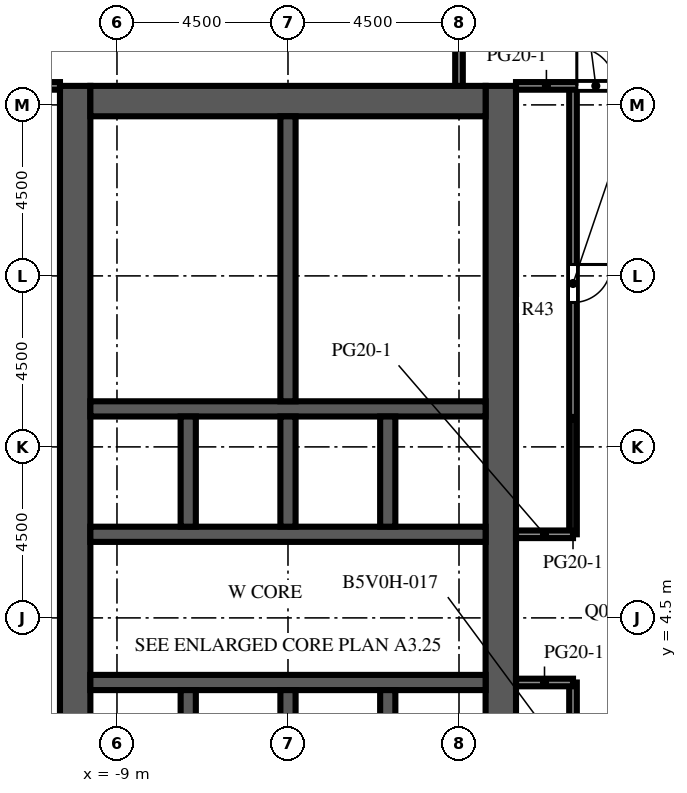
"""IFC4 building model, lengths in metres.
Left out: names, types, materials, properties, quantities, classifications, styles, units other than length and angle.
Written with IfcOpenShell. Run it as: python <this file> out.ifc"""

import sys

from ifc_helpers import new_model, si_unit, direction, frame, frame_2d, origin, place, context, subcontext, project, spatial, rectangle, extrude, element, fill, save


model = new_model("IFC4")
c1 = context("Model", 3, precision=1e-05, world=origin(), true_north=direction((0.0, 1.0)))
c2 = subcontext(c1, "Body", "Model", "MODEL_VIEW")
j1 = project(units=[si_unit("LENGTHUNIT", "METRE"), si_unit("PLANEANGLEUNIT", "RADIAN")], contexts=[c1])
p1 = place(None, origin())
s1 = spatial("IfcSite", under=j1, at=p1, CompositionType="ELEMENT")
p2 = place(p1, origin())
s2 = spatial("IfcBuilding", under=s1, at=p2, CompositionType="ELEMENT")
p3 = place(p2, frame((0.0, 0.0, 156.8)))
s3 = spatial("IfcBuildingStorey", under=s2, at=p3, CompositionType="ELEMENT", Elevation=156.8)
p4 = place(p3, frame((-10.1, -9.0, 0.0), z_axis=(0.0, 0.0, 1.0), x_axis=(0.0, 1.0, 0.0)))
e1 = element("IfcWall", 1, at=p4, inside=s3, PredefinedType="SHEAR", context=c2, shape_type="SweptSolid", body=[
    extrude(rectangle(XDim=27.5, YDim=0.8, at=frame_2d((13.75, 0.0))), origin(), (0.0, 0.0, 1.0), 4.1),
])
p5 = place(p4, frame((12.55, 0.0, 0.0)))
e2 = element("IfcOpeningElement", 2, at=p5, cuts=e1, PredefinedType="OPENING", context=c2, shape_type="SweptSolid", body=[
    extrude(rectangle(XDim=2.4, YDim=2.4, at=frame_2d((1.2, 1.2))), frame((0.0, 0.41, 0.0), z_axis=(0.0, -1.0, 0.0), x_axis=(1.0, 0.0, 0.0)), (0.0, 0.0, 1.0), 0.82),
])
p6 = place(p4, frame((6.825, 0.0, 0.0)))
e3 = element("IfcOpeningElement", 3, at=p6, cuts=e1, PredefinedType="OPENING", context=c2, shape_type="SweptSolid", body=[
    extrude(rectangle(XDim=1.2, YDim=2.1, at=frame_2d((0.6, 1.05))), frame((0.0, 0.41, 0.0), z_axis=(0.0, -1.0, 0.0), x_axis=(1.0, 0.0, 0.0)), (0.0, 0.0, 1.0), 0.82),
])
p7 = place(p4, frame((19.475, 0.0, 0.0)))
e4 = element("IfcOpeningElement", 4, at=p7, cuts=e1, PredefinedType="OPENING", context=c2, shape_type="SweptSolid", body=[
    extrude(rectangle(XDim=1.2, YDim=2.1, at=frame_2d((0.6, 1.05))), frame((0.0, 0.41, 0.0), z_axis=(0.0, -1.0, 0.0), x_axis=(1.0, 0.0, 0.0)), (0.0, 0.0, 1.0), 0.82),
])
p8 = place(p3, frame((1.1, -9.0, 0.0), z_axis=(0.0, 0.0, 1.0), x_axis=(0.0, 1.0, 0.0)))
e5 = element("IfcWall", 5, at=p8, inside=s3, PredefinedType="SHEAR", context=c2, shape_type="SweptSolid", body=[
    extrude(rectangle(XDim=27.5, YDim=0.8, at=frame_2d((13.75, 0.0))), origin(), (0.0, 0.0, 1.0), 4.1),
])
p9 = place(p8, frame((12.55, 0.0, 0.0)))
e6 = element("IfcOpeningElement", 6, at=p9, cuts=e5, PredefinedType="OPENING", context=c2, shape_type="SweptSolid", body=[
    extrude(rectangle(XDim=2.4, YDim=2.4, at=frame_2d((1.2, 1.2))), frame((0.0, 0.41, 0.0), z_axis=(0.0, -1.0, 0.0), x_axis=(1.0, 0.0, 0.0)), (0.0, 0.0, 1.0), 0.82),
])
p10 = place(p8, frame((5.45, 0.0, 0.0)))
e7 = element("IfcOpeningElement", 7, at=p10, cuts=e5, PredefinedType="OPENING", context=c2, shape_type="SweptSolid", body=[
    extrude(rectangle(XDim=1.2, YDim=2.1, at=frame_2d((0.6, 1.05))), frame((0.0, 0.41, 0.0), z_axis=(0.0, -1.0, 0.0), x_axis=(1.0, 0.0, 0.0)), (0.0, 0.0, 1.0), 0.82),
])
p11 = place(p8, frame((19.45, 0.0, 0.0)))
e8 = element("IfcOpeningElement", 8, at=p11, cuts=e5, PredefinedType="OPENING", context=c2, shape_type="SweptSolid", body=[
    extrude(rectangle(XDim=1.0, YDim=2.1, at=frame_2d((0.5, 1.05))), frame((0.0, 0.41, 0.0), z_axis=(0.0, -1.0, 0.0), x_axis=(1.0, 0.0, 0.0)), (0.0, 0.0, 1.0), 0.82),
])
p12 = place(p8, frame((21.137, 0.0, 0.0)))
e9 = element("IfcOpeningElement", 9, at=p12, cuts=e5, PredefinedType="OPENING", context=c2, shape_type="SweptSolid", body=[
    extrude(rectangle(XDim=1.0, YDim=2.1, at=frame_2d((0.5, 1.05))), frame((0.0, 0.41, 0.0), z_axis=(0.0, -1.0, 0.0), x_axis=(1.0, 0.0, 0.0)), (0.0, 0.0, 1.0), 0.82),
])
p13 = place(p8, frame((23.2, 0.0, 0.0)))
e10 = element("IfcOpeningElement", 10, at=p13, cuts=e5, PredefinedType="OPENING", context=c2, shape_type="SweptSolid", body=[
    extrude(rectangle(XDim=1.0, YDim=2.1, at=frame_2d((0.5, 1.05))), frame((0.0, 0.41, 0.0), z_axis=(0.0, -1.0, 0.0), x_axis=(1.0, 0.0, 0.0)), (0.0, 0.0, 1.0), 0.82),
])
p14 = place(p8, frame((25.262, 0.0, 0.0)))
e11 = element("IfcOpeningElement", 11, at=p14, cuts=e5, PredefinedType="OPENING", context=c2, shape_type="SweptSolid", body=[
    extrude(rectangle(XDim=1.0, YDim=2.1, at=frame_2d((0.5, 1.05))), frame((0.0, 0.41, 0.0), z_axis=(0.0, -1.0, 0.0), x_axis=(1.0, 0.0, 0.0)), (0.0, 0.0, 1.0), 0.82),
])
p15 = place(p3, frame((-9.7, 18.1, 0.0), z_axis=(0.0, 0.0, 1.0), x_axis=(1.0, 0.0, 0.0)))
e12 = element("IfcWall", 12, at=p15, inside=s3, PredefinedType="SHEAR", context=c2, shape_type="SweptSolid", body=[
    extrude(rectangle(XDim=10.4, YDim=0.8, at=frame_2d((5.2, 0.0))), origin(), (0.0, 0.0, 1.0), 4.1),
])
p16 = place(p3, frame((-9.7, 2.8, 0.0), z_axis=(0.0, 0.0, 1.0), x_axis=(1.0, 0.0, 0.0)))
e13 = element("IfcWall", 13, at=p16, inside=s3, PredefinedType="SHEAR", context=c2, shape_type="SweptSolid", body=[
    extrude(rectangle(XDim=10.4, YDim=0.4, at=frame_2d((5.2, 0.0))), origin(), (0.0, 0.0, 1.0), 4.1),
])
p17 = place(p16, frame((0.738, 0.0, 0.0)))
e14 = element("IfcOpeningElement", 14, at=p17, cuts=e13, PredefinedType="OPENING", context=c2, shape_type="SweptSolid", body=[
    extrude(rectangle(XDim=1.1, YDim=2.1, at=frame_2d((0.55, 1.05))), frame((0.0, 0.21, 0.0), z_axis=(0.0, -1.0, 0.0), x_axis=(1.0, 0.0, 0.0)), (0.0, 0.0, 1.0), 0.42),
])
p18 = place(p16, frame((3.337, 0.0, 0.0)))
e15 = element("IfcOpeningElement", 15, at=p18, cuts=e13, PredefinedType="OPENING", context=c2, shape_type="SweptSolid", body=[
    extrude(rectangle(XDim=1.1, YDim=2.1, at=frame_2d((0.55, 1.05))), frame((0.0, 0.21, 0.0), z_axis=(0.0, -1.0, 0.0), x_axis=(1.0, 0.0, 0.0)), (0.0, 0.0, 1.0), 0.42),
])
p19 = place(p16, frame((6.012, 0.0, 0.0)))
e16 = element("IfcOpeningElement", 16, at=p19, cuts=e13, PredefinedType="OPENING", context=c2, shape_type="SweptSolid", body=[
    extrude(rectangle(XDim=1.0, YDim=2.1, at=frame_2d((0.5, 1.05))), frame((0.0, 0.21, 0.0), z_axis=(0.0, -1.0, 0.0), x_axis=(1.0, 0.0, 0.0)), (0.0, 0.0, 1.0), 0.42),
])
p20 = place(p16, frame((8.613, 0.0, 0.0)))
e17 = element("IfcOpeningElement", 17, at=p20, cuts=e13, PredefinedType="OPENING", context=c2, shape_type="SweptSolid", body=[
    extrude(rectangle(XDim=1.0, YDim=2.1, at=frame_2d((0.5, 1.05))), frame((0.0, 0.21, 0.0), z_axis=(0.0, -1.0, 0.0), x_axis=(1.0, 0.0, 0.0)), (0.0, 0.0, 1.0), 0.42),
])
p21 = place(p3, frame((-9.7, 6.7, 0.0), z_axis=(0.0, 0.0, 1.0), x_axis=(1.0, 0.0, 0.0)))
e18 = element("IfcWall", 18, at=p21, inside=s3, PredefinedType="SHEAR", context=c2, shape_type="SweptSolid", body=[
    extrude(rectangle(XDim=10.4, YDim=0.4, at=frame_2d((5.2, 0.0))), origin(), (0.0, 0.0, 1.0), 4.1),
])
p22 = place(p21, frame((3.337, 0.0, 0.0)))
e19 = element("IfcOpeningElement", 19, at=p22, cuts=e18, PredefinedType="OPENING", context=c2, shape_type="SweptSolid", body=[
    extrude(rectangle(XDim=1.1, YDim=2.1, at=frame_2d((0.55, 1.05))), frame((0.0, 0.21, 0.0), z_axis=(0.0, -1.0, 0.0), x_axis=(1.0, 0.0, 0.0)), (0.0, 0.0, 1.0), 0.42),
])
p23 = place(p21, frame((5.962, 0.0, 0.0)))
e20 = element("IfcOpeningElement", 20, at=p23, cuts=e18, PredefinedType="OPENING", context=c2, shape_type="SweptSolid", body=[
    extrude(rectangle(XDim=1.1, YDim=2.1, at=frame_2d((0.55, 1.05))), frame((0.0, 0.21, 0.0), z_axis=(0.0, -1.0, 0.0), x_axis=(1.0, 0.0, 0.0)), (0.0, 0.0, 1.0), 0.42),
])
p24 = place(p21, frame((8.663, 0.0, 0.0)))
e21 = element("IfcOpeningElement", 21, at=p24, cuts=e18, PredefinedType="OPENING", context=c2, shape_type="SweptSolid", body=[
    extrude(rectangle(XDim=1.1, YDim=2.1, at=frame_2d((0.55, 1.05))), frame((0.0, 0.21, 0.0), z_axis=(0.0, -1.0, 0.0), x_axis=(1.0, 0.0, 0.0)), (0.0, 0.0, 1.0), 0.42),
])
p25 = place(p21, frame((0.688, 0.0, 0.0)))
e22 = element("IfcOpeningElement", 22, at=p25, cuts=e18, PredefinedType="OPENING", context=c2, shape_type="SweptSolid", body=[
    extrude(rectangle(XDim=1.0, YDim=2.1, at=frame_2d((0.5, 1.05))), frame((0.0, 0.21, 0.0), z_axis=(0.0, -1.0, 0.0), x_axis=(1.0, 0.0, 0.0)), (0.0, 0.0, 1.0), 0.42),
])
p26 = place(p3, frame((-9.7, 10.0, 0.0), z_axis=(0.0, 0.0, 1.0), x_axis=(1.0, 0.0, 0.0)))
e23 = element("IfcWall", 23, at=p26, inside=s3, PredefinedType="SHEAR", context=c2, shape_type="SweptSolid", body=[
    extrude(rectangle(XDim=10.4, YDim=0.4, at=frame_2d((5.2, 0.0))), origin(), (0.0, 0.0, 1.0), 4.1),
])
for number, where, z_axis, x_axis in (
    (24, (-7.125, -0.3, 0.0), (0.0, 0.0, 1.0), (0.0, 1.0, 0.0)),
    (25, (-7.125, 6.9, 0.0), (0.0, 0.0, 1.0), (0.0, 1.0, 0.0)),
    (26, (-4.5, -0.3, 0.0), (0.0, 0.0, 1.0), (0.0, 1.0, 0.0)),
    (27, (-4.5, 6.9, 0.0), (0.0, 0.0, 1.0), (0.0, 1.0, 0.0)),
    (28, (-1.875, -0.3, 0.0), (0.0, 0.0, 1.0), (0.0, 1.0, 0.0)),
    (29, (-1.875, 6.9, 0.0), (0.0, 0.0, 1.0), (0.0, 1.0, 0.0)),
):
    element("IfcWall", number, at=place(p3, frame(where, z_axis=z_axis, x_axis=x_axis)), inside=s3, PredefinedType="SHEAR", context=c2, shape_type="SweptSolid", body=[
        extrude(rectangle(XDim=2.9, YDim=0.4, at=frame_2d((1.45, 0.0))), origin(), (0.0, 0.0, 1.0), 4.1),
    ])
p27 = place(p3, frame((-4.5, 10.2, 0.0), z_axis=(0.0, 0.0, 1.0), x_axis=(0.0, 1.0, 0.0)))
e30 = element("IfcWall", 30, at=p27, inside=s3, PredefinedType="SHEAR", context=c2, shape_type="SweptSolid", body=[
    extrude(rectangle(XDim=7.5, YDim=0.4, at=frame_2d((3.75, 0.0))), origin(), (0.0, 0.0, 1.0), 4.1),
])
for number, where, z_axis, x_axis in (
    (31, (-4.3, 11.7, 0.0), (0.0, 0.0, 1.0), (1.0, 0.0, 0.0)),
    (32, (-4.3, 13.575, 0.0), (0.0, 0.0, 1.0), (1.0, 0.0, 0.0)),
    (33, (-4.3, 15.825, 0.0), (0.0, 0.0, 1.0), (1.0, 0.0, 0.0)),
):
    element("IfcWall", number, at=place(p3, frame(where, z_axis=z_axis, x_axis=x_axis)), inside=s3, PredefinedType="PARTITIONING", context=c2, shape_type="SweptSolid", body=[
        extrude(rectangle(XDim=5.0, YDim=0.1, at=frame_2d((2.5, 0.0))), origin(), (0.0, 0.0, 1.0), 3.65),
    ])
p28 = place(p3, frame((0.0, 18.5, 0.0), z_axis=(0.0, 0.0, 1.0), x_axis=(0.0, 1.0, 0.0)))
e34 = element("IfcWall", 34, at=p28, inside=s3, PredefinedType="PARTITIONING", context=c2, shape_type="SweptSolid", body=[
    extrude(rectangle(XDim=3.4, YDim=0.2, at=frame_2d((1.7, 0.0))), origin(), (0.0, 0.0, 1.0), 3.65),
])
p29 = place(p3, frame((3.0, -2.0, 0.0), z_axis=(0.0, 0.0, 1.0), x_axis=(0.0, 1.0, 0.0)))
e35 = element("IfcWall", 35, at=p29, inside=s3, PredefinedType="PARTITIONING", context=c2, shape_type="SweptSolid", body=[
    extrude(rectangle(XDim=4.8, YDim=0.2, at=frame_2d((2.4, 0.0))), origin(), (0.0, 0.0, 1.0), 3.65),
])
p30 = place(p29, frame((2.1, 0.0, 0.0)))
e36 = element("IfcOpeningElement", 36, at=p30, cuts=e35, PredefinedType="OPENING", context=c2, shape_type="SweptSolid", body=[
    extrude(rectangle(XDim=1.0, YDim=2.1, at=frame_2d((0.5, 1.05))), frame((0.0, 0.11, 0.0), z_axis=(0.0, -1.0, 0.0), x_axis=(1.0, 0.0, 0.0)), (0.0, 0.0, 1.0), 0.22),
])
p31 = place(p3, frame((3.0, 6.7, 0.0), z_axis=(0.0, 0.0, 1.0), x_axis=(0.0, 1.0, 0.0)))
e37 = element("IfcWall", 37, at=p31, inside=s3, PredefinedType="PARTITIONING", context=c2, shape_type="SweptSolid", body=[
    extrude(rectangle(XDim=11.8, YDim=0.2, at=frame_2d((5.9, 0.0))), origin(), (0.0, 0.0, 1.0), 3.65),
])
p32 = place(p31, frame((6.1, 0.0, 0.0)))
e38 = element("IfcOpeningElement", 38, at=p32, cuts=e37, PredefinedType="OPENING", context=c2, shape_type="SweptSolid", body=[
    extrude(rectangle(XDim=1.0, YDim=2.1, at=frame_2d((0.5, 1.05))), frame((0.0, 0.11, 0.0), z_axis=(0.0, -1.0, 0.0), x_axis=(1.0, 0.0, 0.0)), (0.0, 0.0, 1.0), 0.22),
])
for number, where, z_axis, x_axis in (
    (39, (1.5, 2.8, 0.0), (0.0, 0.0, 1.0), (1.0, 0.0, 0.0)),
    (40, (1.5, 6.7, 0.0), (0.0, 0.0, 1.0), (1.0, 0.0, 0.0)),
):
    element("IfcWall", number, at=place(p3, frame(where, z_axis=z_axis, x_axis=x_axis)), inside=s3, PredefinedType="PARTITIONING", context=c2, shape_type="SweptSolid", body=[
        extrude(rectangle(XDim=1.5, YDim=0.2, at=frame_2d((0.75, 0.0))), origin(), (0.0, 0.0, 1.0), 3.65),
    ])
p33 = place(p3, frame((-13.5, 18.5, 0.0), z_axis=(0.0, 0.0, 1.0), x_axis=(1.0, 0.0, 0.0)))
e41 = element("IfcWall", 41, at=p33, inside=s3, PredefinedType="PARTITIONING", context=c2, shape_type="SweptSolid", body=[
    extrude(rectangle(XDim=3.0, YDim=0.2, at=frame_2d((1.5, 0.0))), origin(), (0.0, 0.0, 1.0), 3.65),
])
p34 = place(p33, frame((1.35, 0.0, 0.0)))
e42 = element("IfcOpeningElement", 42, at=p34, cuts=e41, PredefinedType="OPENING", context=c2, shape_type="SweptSolid", body=[
    extrude(rectangle(XDim=1.0, YDim=2.1, at=frame_2d((0.5, 1.05))), frame((0.0, 0.11, 0.0), z_axis=(0.0, -1.0, 0.0), x_axis=(1.0, 0.0, 0.0)), (0.0, 0.0, 1.0), 0.22),
])
p35 = place(p3, frame((1.5, 18.5, 0.0), z_axis=(0.0, 0.0, 1.0), x_axis=(1.0, 0.0, 0.0)))
e43 = element("IfcWall", 43, at=p35, inside=s3, PredefinedType="PARTITIONING", context=c2, shape_type="SweptSolid", body=[
    extrude(rectangle(XDim=4.5, YDim=0.2, at=frame_2d((2.25, 0.0))), origin(), (0.0, 0.0, 1.0), 3.65),
])
p36 = place(p35, frame((1.6, 0.0, 0.0)))
e44 = element("IfcOpeningElement", 44, at=p36, cuts=e43, PredefinedType="OPENING", context=c2, shape_type="SweptSolid", body=[
    extrude(rectangle(XDim=1.0, YDim=2.1, at=frame_2d((0.5, 1.05))), frame((0.0, 0.11, 0.0), z_axis=(0.0, -1.0, 0.0), x_axis=(1.0, 0.0, 0.0)), (0.0, 0.0, 1.0), 0.22),
])
p37 = place(p35, frame((3.35, 0.0, 0.0)))
e45 = element("IfcOpeningElement", 45, at=p37, cuts=e43, PredefinedType="OPENING", context=c2, shape_type="SweptSolid", body=[
    extrude(rectangle(XDim=1.0, YDim=2.1, at=frame_2d((0.5, 1.05))), frame((0.0, 0.11, 0.0), z_axis=(0.0, -1.0, 0.0), x_axis=(1.0, 0.0, 0.0)), (0.0, 0.0, 1.0), 0.22),
])
p38 = place(p17, origin())
e46 = element("IfcDoor", 46, at=p38, inside=s3, OperationType="DOUBLE_DOOR_SLIDING", PredefinedType="DOOR", context=c2, shape_type="SweptSolid", body=[
    extrude(rectangle(XDim=1.1, YDim=2.1, at=frame_2d((0.55, 1.05))), frame((0.0, 0.025, 0.0), z_axis=(0.0, -1.0, 0.0), x_axis=(1.0, 0.0, 0.0)), (0.0, 0.0, 1.0), 0.05),
])
fill(e14, e46)
p39 = place(p18, origin())
e47 = element("IfcDoor", 47, at=p39, inside=s3, OperationType="DOUBLE_DOOR_SLIDING", PredefinedType="DOOR", context=c2, shape_type="SweptSolid", body=[
    extrude(rectangle(XDim=1.1, YDim=2.1, at=frame_2d((0.55, 1.05))), frame((0.0, 0.025, 0.0), z_axis=(0.0, -1.0, 0.0), x_axis=(1.0, 0.0, 0.0)), (0.0, 0.0, 1.0), 0.05),
])
fill(e15, e47)
p40 = place(p22, origin())
e48 = element("IfcDoor", 48, at=p40, inside=s3, OperationType="DOUBLE_DOOR_SLIDING", PredefinedType="DOOR", context=c2, shape_type="SweptSolid", body=[
    extrude(rectangle(XDim=1.1, YDim=2.1, at=frame_2d((0.55, 1.05))), frame((0.0, 0.025, 0.0), z_axis=(0.0, -1.0, 0.0), x_axis=(1.0, 0.0, 0.0)), (0.0, 0.0, 1.0), 0.05),
])
fill(e19, e48)
p41 = place(p23, origin())
e49 = element("IfcDoor", 49, at=p41, inside=s3, OperationType="DOUBLE_DOOR_SLIDING", PredefinedType="DOOR", context=c2, shape_type="SweptSolid", body=[
    extrude(rectangle(XDim=1.1, YDim=2.1, at=frame_2d((0.55, 1.05))), frame((0.0, 0.025, 0.0), z_axis=(0.0, -1.0, 0.0), x_axis=(1.0, 0.0, 0.0)), (0.0, 0.0, 1.0), 0.05),
])
fill(e20, e49)
p42 = place(p24, origin())
e50 = element("IfcDoor", 50, at=p42, inside=s3, OperationType="DOUBLE_DOOR_SLIDING", PredefinedType="DOOR", context=c2, shape_type="SweptSolid", body=[
    extrude(rectangle(XDim=1.1, YDim=2.1, at=frame_2d((0.55, 1.05))), frame((0.0, 0.025, 0.0), z_axis=(0.0, -1.0, 0.0), x_axis=(1.0, 0.0, 0.0)), (0.0, 0.0, 1.0), 0.05),
])
fill(e21, e50)
p43 = place(p5, origin())
e51 = element("IfcDoor", 51, at=p43, inside=s3, OperationType="DOUBLE_DOOR_DOUBLE_SWING", PredefinedType="DOOR", context=c2, shape_type="SweptSolid", body=[
    extrude(rectangle(XDim=2.4, YDim=2.4, at=frame_2d((1.2, 1.2))), frame((0.0, 0.025, 0.0), z_axis=(0.0, -1.0, 0.0), x_axis=(1.0, 0.0, 0.0)), (0.0, 0.0, 1.0), 0.05),
])
fill(e2, e51)
p44 = place(p9, origin())
e52 = element("IfcDoor", 52, at=p44, inside=s3, OperationType="DOUBLE_DOOR_DOUBLE_SWING", PredefinedType="DOOR", context=c2, shape_type="SweptSolid", body=[
    extrude(rectangle(XDim=2.4, YDim=2.4, at=frame_2d((1.2, 1.2))), frame((0.0, 0.025, 0.0), z_axis=(0.0, -1.0, 0.0), x_axis=(1.0, 0.0, 0.0)), (0.0, 0.0, 1.0), 0.05),
])
fill(e6, e52)
p45 = place(p7, origin())
e53 = element("IfcDoor", 53, at=p45, inside=s3, OperationType="SINGLE_SWING_LEFT", PredefinedType="DOOR", context=c2, shape_type="SweptSolid", body=[
    extrude(rectangle(XDim=1.2, YDim=2.1, at=frame_2d((0.6, 1.05))), frame((0.0, 0.025, 0.0), z_axis=(0.0, -1.0, 0.0), x_axis=(1.0, 0.0, 0.0)), (0.0, 0.0, 1.0), 0.05),
])
fill(e4, e53)
p46 = place(p19, origin())
e54 = element("IfcDoor", 54, at=p46, inside=s3, OperationType="SINGLE_SWING_LEFT", PredefinedType="DOOR", context=c2, shape_type="SweptSolid", body=[
    extrude(rectangle(XDim=1.0, YDim=2.1, at=frame_2d((0.5, 1.05))), frame((0.0, 0.025, 0.0), z_axis=(0.0, -1.0, 0.0), x_axis=(1.0, 0.0, 0.0)), (0.0, 0.0, 1.0), 0.05),
])
fill(e16, e54)
p47 = place(p20, origin())
e55 = element("IfcDoor", 55, at=p47, inside=s3, OperationType="SINGLE_SWING_RIGHT", PredefinedType="DOOR", context=c2, shape_type="SweptSolid", body=[
    extrude(rectangle(XDim=1.0, YDim=2.1, at=frame_2d((0.5, 1.05))), frame((0.0, 0.025, 0.0), z_axis=(0.0, -1.0, 0.0), x_axis=(1.0, 0.0, 0.0)), (0.0, 0.0, 1.0), 0.05),
])
fill(e17, e55)
p48 = place(p25, origin())
e56 = element("IfcDoor", 56, at=p48, inside=s3, OperationType="SINGLE_SWING_LEFT", PredefinedType="DOOR", context=c2, shape_type="SweptSolid", body=[
    extrude(rectangle(XDim=1.0, YDim=2.1, at=frame_2d((0.5, 1.05))), frame((0.0, 0.025, 0.0), z_axis=(0.0, -1.0, 0.0), x_axis=(1.0, 0.0, 0.0)), (0.0, 0.0, 1.0), 0.05),
])
fill(e22, e56)
p49 = place(p11, origin())
e57 = element("IfcDoor", 57, at=p49, inside=s3, OperationType="SINGLE_SWING_LEFT", PredefinedType="DOOR", context=c2, shape_type="SweptSolid", body=[
    extrude(rectangle(XDim=1.0, YDim=2.1, at=frame_2d((0.5, 1.05))), frame((0.0, 0.375, 0.0), z_axis=(0.0, -1.0, 0.0), x_axis=(1.0, 0.0, 0.0)), (0.0, 0.0, 1.0), 0.05),
])
fill(e8, e57)
p50 = place(p12, origin())
e58 = element("IfcDoor", 58, at=p50, inside=s3, OperationType="SINGLE_SWING_RIGHT", PredefinedType="DOOR", context=c2, shape_type="SweptSolid", body=[
    extrude(rectangle(XDim=1.0, YDim=2.1, at=frame_2d((0.5, 1.05))), frame((0.0, 0.375, 0.0), z_axis=(0.0, -1.0, 0.0), x_axis=(1.0, 0.0, 0.0)), (0.0, 0.0, 1.0), 0.05),
])
fill(e9, e58)
p51 = place(p13, origin())
e59 = element("IfcDoor", 59, at=p51, inside=s3, OperationType="SINGLE_SWING_LEFT", PredefinedType="DOOR", context=c2, shape_type="SweptSolid", body=[
    extrude(rectangle(XDim=1.0, YDim=2.1, at=frame_2d((0.5, 1.05))), frame((0.0, 0.375, 0.0), z_axis=(0.0, -1.0, 0.0), x_axis=(1.0, 0.0, 0.0)), (0.0, 0.0, 1.0), 0.05),
])
fill(e10, e59)
p52 = place(p14, origin())
e60 = element("IfcDoor", 60, at=p52, inside=s3, OperationType="SINGLE_SWING_RIGHT", PredefinedType="DOOR", context=c2, shape_type="SweptSolid", body=[
    extrude(rectangle(XDim=1.0, YDim=2.1, at=frame_2d((0.5, 1.05))), frame((0.0, 0.375, 0.0), z_axis=(0.0, -1.0, 0.0), x_axis=(1.0, 0.0, 0.0)), (0.0, 0.0, 1.0), 0.05),
])
fill(e11, e60)
p53 = place(p32, origin())
e61 = element("IfcDoor", 61, at=p53, inside=s3, OperationType="SINGLE_SWING_RIGHT", PredefinedType="DOOR", context=c2, shape_type="SweptSolid", body=[
    extrude(rectangle(XDim=1.0, YDim=2.1, at=frame_2d((0.5, 1.05))), frame((0.0, 0.025, 0.0), z_axis=(0.0, -1.0, 0.0), x_axis=(1.0, 0.0, 0.0)), (0.0, 0.0, 1.0), 0.05),
])
fill(e38, e61)
p54 = place(p36, origin())
e62 = element("IfcDoor", 62, at=p54, inside=s3, OperationType="SINGLE_SWING_LEFT", PredefinedType="DOOR", context=c2, shape_type="SweptSolid", body=[
    extrude(rectangle(XDim=1.0, YDim=2.1, at=frame_2d((0.5, 1.05))), frame((0.0, 0.025, 0.0), z_axis=(0.0, -1.0, 0.0), x_axis=(1.0, 0.0, 0.0)), (0.0, 0.0, 1.0), 0.05),
])
fill(e44, e62)
save(model, sys.argv[1])
